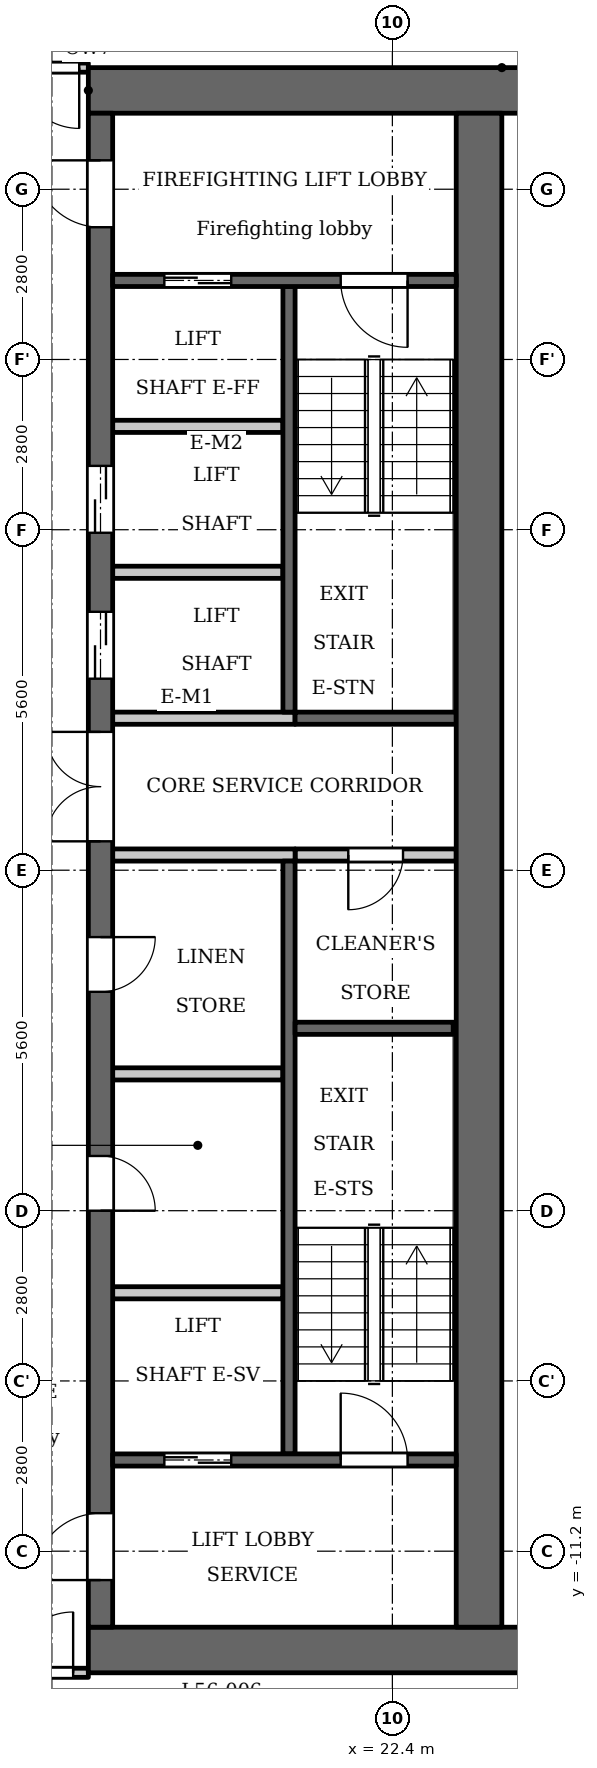
"""IFC4 building model, lengths in metres.
Left out: names, types, materials, properties, quantities, classifications, styles, units other than length and angle.
Written with IfcOpenShell. Run it as: python <this file> out.ifc"""

import sys

from ifc_helpers import new_model, si_unit, direction, frame, frame_2d, origin, place, context, subcontext, project, spatial, rectangle, extrude, element, fill, save


model = new_model("IFC4")
c1 = context("Model", 3, precision=1e-05, world=origin(), true_north=direction((0.0, 1.0)))
c2 = subcontext(c1, "Body", "Model", "MODEL_VIEW")
j1 = project(units=[si_unit("LENGTHUNIT", "METRE"), si_unit("PLANEANGLEUNIT", "RADIAN")], contexts=[c1])
p1 = place(None, origin())
s1 = spatial("IfcSite", under=j1, at=p1, CompositionType="ELEMENT")
p2 = place(p1, origin())
s2 = spatial("IfcBuilding", under=s1, at=p2, CompositionType="ELEMENT")
p3 = place(p2, frame((0.0, 0.0, 216.9)))
s3 = spatial("IfcBuildingStorey", under=s2, at=p3, CompositionType="ELEMENT", Elevation=216.9)
p4 = place(p3, frame((20.7, 2.6, 0.0), z_axis=(0.0, 0.0, 1.0), x_axis=(0.0, 1.0, 0.0)))
e1 = element("IfcWall", 1, at=p4, inside=s3, PredefinedType="SHEAR", context=c2, shape_type="SweptSolid", body=[
    extrude(rectangle(XDim=7.0, YDim=0.2, at=frame_2d((3.5, 0.0))), origin(), (0.0, 0.0, 1.0), 3.2),
])
p5 = place(p3, frame((20.7, -9.6, 0.0), z_axis=(0.0, 0.0, 1.0), x_axis=(0.0, 1.0, 0.0)))
e2 = element("IfcWall", 2, at=p5, inside=s3, PredefinedType="SHEAR", context=c2, shape_type="SweptSolid", body=[
    extrude(rectangle(XDim=9.75, YDim=0.2, at=frame_2d((4.875, 0.0))), origin(), (0.0, 0.0, 1.0), 3.2),
])
p6 = place(p3, frame((20.8, 2.5, 0.0), z_axis=(0.0, 0.0, 1.0), x_axis=(1.0, 0.0, 0.0)))
e3 = element("IfcWall", 3, at=p6, inside=s3, PredefinedType="SHEAR", context=c2, shape_type="SweptSolid", body=[
    extrude(rectangle(XDim=2.65, YDim=0.2, at=frame_2d((1.325, 0.0))), origin(), (0.0, 0.0, 1.0), 3.2),
])
p7 = place(p3, frame((20.8, 0.25, 0.0), z_axis=(0.0, 0.0, 1.0), x_axis=(1.0, 0.0, 0.0)))
e4 = element("IfcWall", 4, at=p7, inside=s3, PredefinedType="PARTITIONING", context=c2, shape_type="SweptSolid", body=[
    extrude(rectangle(XDim=2.65, YDim=0.2, at=frame_2d((1.325, 0.0))), origin(), (0.0, 0.0, 1.0), 3.2),
])
p8 = place(p7, frame((0.875, 0.0, 0.0)))
e5 = element("IfcOpeningElement", 5, at=p8, cuts=e4, PredefinedType="OPENING", context=c2, shape_type="SweptSolid", body=[
    extrude(rectangle(XDim=0.9, YDim=2.1, at=frame_2d((0.45, 1.05))), frame((0.0, 0.11, 0.0), z_axis=(0.0, -1.0, 0.0), x_axis=(1.0, 0.0, 0.0)), (0.0, 0.0, 1.0), 0.22),
])
for number, where, z_axis, x_axis in (
    (6, (17.4, 12.825, 0.0), (0.0, 0.0, 1.0), (1.0, 0.0, 0.0)),
    (7, (17.4, -12.825, 0.0), (0.0, 0.0, 1.0), (1.0, 0.0, 0.0)),
):
    element("IfcWall", number, at=place(p3, frame(where, z_axis=z_axis, x_axis=x_axis)), inside=s3, PredefinedType="SHEAR", context=c2, shape_type="SweptSolid", body=[
        extrude(rectangle(XDim=7.6, YDim=0.75, at=frame_2d((3.8, 0.0))), origin(), (0.0, 0.0, 1.0), 3.2),
    ])
p9 = place(p3, frame((17.8, -3.35, 0.0), z_axis=(0.0, 0.0, 1.0), x_axis=(1.0, 0.0, 0.0)))
e8 = element("IfcWall", 8, at=p9, inside=s3, PredefinedType="PARTITIONING", context=c2, shape_type="SweptSolid", body=[
    extrude(rectangle(XDim=2.8, YDim=0.2, at=frame_2d((1.4, 0.0))), origin(), (0.0, 0.0, 1.0), 3.2),
])
p10 = place(p3, frame((17.6, -12.45, 0.0), z_axis=(0.0, 0.0, 1.0), x_axis=(0.0, 1.0, 0.0)))
e9 = element("IfcWall", 9, at=p10, inside=s3, PredefinedType="SHEAR", context=c2, shape_type="SweptSolid", body=[
    extrude(rectangle(XDim=24.9, YDim=0.4, at=frame_2d((12.45, 0.0))), origin(), (0.0, 0.0, 1.0), 3.2),
])
p11 = place(p10, frame((6.85, 0.0, 0.0)))
e10 = element("IfcOpeningElement", 10, at=p11, cuts=e9, PredefinedType="OPENING", context=c2, shape_type="SweptSolid", body=[
    extrude(rectangle(XDim=0.9, YDim=2.1, at=frame_2d((0.45, 1.05))), frame((0.0, 0.21, 0.0), z_axis=(0.0, -1.0, 0.0), x_axis=(1.0, 0.0, 0.0)), (0.0, 0.0, 1.0), 0.42),
])
p12 = place(p10, frame((10.45, 0.0, 0.0)))
e11 = element("IfcOpeningElement", 11, at=p12, cuts=e9, PredefinedType="OPENING", context=c2, shape_type="SweptSolid", body=[
    extrude(rectangle(XDim=0.9, YDim=2.1, at=frame_2d((0.45, 1.05))), frame((0.0, 0.21, 0.0), z_axis=(0.0, -1.0, 0.0), x_axis=(1.0, 0.0, 0.0)), (0.0, 0.0, 1.0), 0.42),
])
p13 = place(p10, frame((15.6, 0.0, 0.0)))
e12 = element("IfcOpeningElement", 12, at=p13, cuts=e9, PredefinedType="OPENING", context=c2, shape_type="SweptSolid", body=[
    extrude(rectangle(XDim=1.1, YDim=2.1, at=frame_2d((0.55, 1.05))), frame((0.0, 0.21, 0.0), z_axis=(0.0, -1.0, 0.0), x_axis=(1.0, 0.0, 0.0)), (0.0, 0.0, 1.0), 0.42),
])
p14 = place(p10, frame((18.0, 0.0, 0.0)))
e13 = element("IfcOpeningElement", 13, at=p14, cuts=e9, PredefinedType="OPENING", context=c2, shape_type="SweptSolid", body=[
    extrude(rectangle(XDim=1.1, YDim=2.1, at=frame_2d((0.55, 1.05))), frame((0.0, 0.21, 0.0), z_axis=(0.0, -1.0, 0.0), x_axis=(1.0, 0.0, 0.0)), (0.0, 0.0, 1.0), 0.42),
])
p15 = place(p10, frame((23.025, 0.0, 0.0)))
e14 = element("IfcOpeningElement", 14, at=p15, cuts=e9, PredefinedType="OPENING", context=c2, shape_type="SweptSolid", body=[
    extrude(rectangle(XDim=1.1, YDim=2.1, at=frame_2d((0.55, 1.05))), frame((0.0, 0.21, 0.0), z_axis=(0.0, -1.0, 0.0), x_axis=(1.0, 0.0, 0.0)), (0.0, 0.0, 1.0), 0.42),
])
p16 = place(p10, frame((0.775, 0.0, 0.0)))
e15 = element("IfcOpeningElement", 15, at=p16, cuts=e9, PredefinedType="OPENING", context=c2, shape_type="SweptSolid", body=[
    extrude(rectangle(XDim=1.1, YDim=2.1, at=frame_2d((0.55, 1.05))), frame((0.0, 0.21, 0.0), z_axis=(0.0, -1.0, 0.0), x_axis=(1.0, 0.0, 0.0)), (0.0, 0.0, 1.0), 0.42),
])
p17 = place(p10, frame((12.925, 0.0, 0.0)))
e16 = element("IfcOpeningElement", 16, at=p17, cuts=e9, PredefinedType="OPENING", context=c2, shape_type="SweptSolid", body=[
    extrude(rectangle(XDim=1.8, YDim=2.1, at=frame_2d((0.9, 1.05))), frame((0.0, 0.21, 0.0), z_axis=(0.0, -1.0, 0.0), x_axis=(1.0, 0.0, 0.0)), (0.0, 0.0, 1.0), 0.42),
])
p18 = place(p3, frame((23.825, -12.45, 0.0), z_axis=(0.0, 0.0, 1.0), x_axis=(0.0, 1.0, 0.0)))
e17 = element("IfcWall", 17, at=p18, inside=s3, PredefinedType="SHEAR", context=c2, shape_type="SweptSolid", body=[
    extrude(rectangle(XDim=24.9, YDim=0.75, at=frame_2d((12.45, 0.0))), origin(), (0.0, 0.0, 1.0), 3.2),
])
p19 = place(p3, frame((17.8, -9.7, 0.0), z_axis=(0.0, 0.0, 1.0), x_axis=(1.0, 0.0, 0.0)))
e18 = element("IfcWall", 18, at=p19, inside=s3, PredefinedType="SHEAR", context=c2, shape_type="SweptSolid", body=[
    extrude(rectangle(XDim=5.65, YDim=0.2, at=frame_2d((2.825, 0.0))), origin(), (0.0, 0.0, 1.0), 3.2),
])
p20 = place(p19, frame((0.85, 0.0, 0.0)))
e19 = element("IfcOpeningElement", 19, at=p20, cuts=e18, PredefinedType="OPENING", context=c2, shape_type="SweptSolid", body=[
    extrude(rectangle(XDim=1.1, YDim=2.1, at=frame_2d((0.55, 1.05))), frame((0.0, 0.11, 0.0), z_axis=(0.0, -1.0, 0.0), x_axis=(1.0, 0.0, 0.0)), (0.0, 0.0, 1.0), 0.22),
])
p21 = place(p19, frame((3.75, 0.0, 0.0)))
e20 = element("IfcOpeningElement", 20, at=p21, cuts=e18, PredefinedType="OPENING", context=c2, shape_type="SweptSolid", body=[
    extrude(rectangle(XDim=1.1, YDim=2.1, at=frame_2d((0.55, 1.05))), frame((0.0, 0.11, 0.0), z_axis=(0.0, -1.0, 0.0), x_axis=(1.0, 0.0, 0.0)), (0.0, 0.0, 1.0), 0.22),
])
p22 = place(p3, frame((17.8, -6.95, 0.0), z_axis=(0.0, 0.0, 1.0), x_axis=(1.0, 0.0, 0.0)))
e21 = element("IfcWall", 21, at=p22, inside=s3, PredefinedType="PARTITIONING", context=c2, shape_type="SweptSolid", body=[
    extrude(rectangle(XDim=2.8, YDim=0.2, at=frame_2d((1.4, 0.0))), origin(), (0.0, 0.0, 1.0), 3.2),
])
for number, where, z_axis, x_axis in (
    (22, (17.8, 0.25, 0.0), (0.0, 0.0, 1.0), (1.0, 0.0, 0.0)),
    (23, (17.8, 2.5, 0.0), (0.0, 0.0, 1.0), (1.0, 0.0, 0.0)),
):
    element("IfcWall", number, at=place(p3, frame(where, z_axis=z_axis, x_axis=x_axis)), inside=s3, PredefinedType="PARTITIONING", context=c2, shape_type="SweptSolid", body=[
        extrude(rectangle(XDim=3.0, YDim=0.2, at=frame_2d((1.5, 0.0))), origin(), (0.0, 0.0, 1.0), 3.2),
    ])
for number, where, z_axis, x_axis in (
    (24, (17.8, 4.9, 0.0), (0.0, 0.0, 1.0), (1.0, 0.0, 0.0)),
    (25, (17.8, 7.3, 0.0), (0.0, 0.0, 1.0), (1.0, 0.0, 0.0)),
):
    element("IfcWall", number, at=place(p3, frame(where, z_axis=z_axis, x_axis=x_axis)), inside=s3, PredefinedType="PARTITIONING", context=c2, shape_type="SweptSolid", body=[
        extrude(rectangle(XDim=2.8, YDim=0.2, at=frame_2d((1.4, 0.0))), origin(), (0.0, 0.0, 1.0), 3.2),
    ])
p23 = place(p3, frame((17.8, 9.7, 0.0), z_axis=(0.0, 0.0, 1.0), x_axis=(1.0, 0.0, 0.0)))
e26 = element("IfcWall", 26, at=p23, inside=s3, PredefinedType="SHEAR", context=c2, shape_type="SweptSolid", body=[
    extrude(rectangle(XDim=5.65, YDim=0.2, at=frame_2d((2.825, 0.0))), origin(), (0.0, 0.0, 1.0), 3.2),
])
p24 = place(p23, frame((0.85, 0.0, 0.0)))
e27 = element("IfcOpeningElement", 27, at=p24, cuts=e26, PredefinedType="OPENING", context=c2, shape_type="SweptSolid", body=[
    extrude(rectangle(XDim=1.1, YDim=2.1, at=frame_2d((0.55, 1.05))), frame((0.0, 0.11, 0.0), z_axis=(0.0, -1.0, 0.0), x_axis=(1.0, 0.0, 0.0)), (0.0, 0.0, 1.0), 0.22),
])
p25 = place(p23, frame((3.75, 0.0, 0.0)))
e28 = element("IfcOpeningElement", 28, at=p25, cuts=e26, PredefinedType="OPENING", context=c2, shape_type="SweptSolid", body=[
    extrude(rectangle(XDim=1.1, YDim=2.1, at=frame_2d((0.55, 1.05))), frame((0.0, 0.11, 0.0), z_axis=(0.0, -1.0, 0.0), x_axis=(1.0, 0.0, 0.0)), (0.0, 0.0, 1.0), 0.22),
])
p26 = place(p3, frame((20.8, -2.6, 0.0), z_axis=(0.0, 0.0, 1.0), x_axis=(1.0, 0.0, 0.0)))
e29 = element("IfcWall", 29, at=p26, inside=s3, PredefinedType="SHEAR", context=c2, shape_type="SweptSolid", body=[
    extrude(rectangle(XDim=2.6, YDim=0.2, at=frame_2d((1.3, 0.0))), origin(), (0.0, 0.0, 1.0), 3.2),
])
p27 = place(p3, frame((-17.4, -13.2, 0.0), z_axis=(0.0, 0.0, 1.0), x_axis=(1.0, 0.0, 0.0)))
e30 = element("IfcWall", 30, at=p27, inside=s3, PredefinedType="PARTITIONING", context=c2, shape_type="SweptSolid", body=[
    extrude(rectangle(XDim=34.8, YDim=0.15, at=frame_2d((17.4, 0.0))), origin(), (0.0, 0.0, 1.0), 3.2),
])
p28 = place(p27, frame((0.15, 0.0, 0.0)))
e31 = element("IfcOpeningElement", 31, at=p28, cuts=e30, PredefinedType="OPENING", context=c2, shape_type="SweptSolid", body=[
    extrude(rectangle(XDim=1.0, YDim=2.1, at=frame_2d((0.5, 1.05))), frame((0.0, 0.085, 0.0), z_axis=(0.0, -1.0, 0.0), x_axis=(1.0, 0.0, 0.0)), (0.0, 0.0, 1.0), 0.17),
])
p29 = place(p27, frame((33.55, 0.0, 0.0)))
e32 = element("IfcOpeningElement", 32, at=p29, cuts=e30, PredefinedType="OPENING", context=c2, shape_type="SweptSolid", body=[
    extrude(rectangle(XDim=1.0, YDim=2.1, at=frame_2d((0.5, 1.05))), frame((0.0, 0.085, 0.0), z_axis=(0.0, -1.0, 0.0), x_axis=(1.0, 0.0, 0.0)), (0.0, 0.0, 1.0), 0.17),
])
p30 = place(p27, frame((3.7, 0.0, 0.0)))
e33 = element("IfcOpeningElement", 33, at=p30, cuts=e30, PredefinedType="OPENING", context=c2, shape_type="SweptSolid", body=[
    extrude(rectangle(XDim=1.0, YDim=2.1, at=frame_2d((0.5, 1.05))), frame((0.0, 0.085, 0.0), z_axis=(0.0, -1.0, 0.0), x_axis=(1.0, 0.0, 0.0)), (0.0, 0.0, 1.0), 0.17),
])
p31 = place(p27, frame((15.7, 0.0, 0.0)))
e34 = element("IfcOpeningElement", 34, at=p31, cuts=e30, PredefinedType="OPENING", context=c2, shape_type="SweptSolid", body=[
    extrude(rectangle(XDim=1.0, YDim=2.1, at=frame_2d((0.5, 1.05))), frame((0.0, 0.085, 0.0), z_axis=(0.0, -1.0, 0.0), x_axis=(1.0, 0.0, 0.0)), (0.0, 0.0, 1.0), 0.17),
])
p32 = place(p27, frame((21.3, 0.0, 0.0)))
e35 = element("IfcOpeningElement", 35, at=p32, cuts=e30, PredefinedType="OPENING", context=c2, shape_type="SweptSolid", body=[
    extrude(rectangle(XDim=1.0, YDim=2.1, at=frame_2d((0.5, 1.05))), frame((0.0, 0.085, 0.0), z_axis=(0.0, -1.0, 0.0), x_axis=(1.0, 0.0, 0.0)), (0.0, 0.0, 1.0), 0.17),
])
p33 = place(p27, frame((29.5, 0.0, 0.0)))
e36 = element("IfcOpeningElement", 36, at=p33, cuts=e30, PredefinedType="OPENING", context=c2, shape_type="SweptSolid", body=[
    extrude(rectangle(XDim=1.0, YDim=2.1, at=frame_2d((0.5, 1.05))), frame((0.0, 0.085, 0.0), z_axis=(0.0, -1.0, 0.0), x_axis=(1.0, 0.0, 0.0)), (0.0, 0.0, 1.0), 0.17),
])
p34 = place(p3, frame((-17.4, 13.2, 0.0), z_axis=(0.0, 0.0, 1.0), x_axis=(1.0, 0.0, 0.0)))
e37 = element("IfcWall", 37, at=p34, inside=s3, PredefinedType="PARTITIONING", context=c2, shape_type="SweptSolid", body=[
    extrude(rectangle(XDim=34.8, YDim=0.15, at=frame_2d((17.4, 0.0))), origin(), (0.0, 0.0, 1.0), 3.2),
])
p35 = place(p34, frame((0.25, 0.0, 0.0)))
e38 = element("IfcOpeningElement", 38, at=p35, cuts=e37, PredefinedType="OPENING", context=c2, shape_type="SweptSolid", body=[
    extrude(rectangle(XDim=1.0, YDim=2.1, at=frame_2d((0.5, 1.05))), frame((0.0, 0.085, 0.0), z_axis=(0.0, -1.0, 0.0), x_axis=(1.0, 0.0, 0.0)), (0.0, 0.0, 1.0), 0.17),
])
p36 = place(p34, frame((33.65, 0.0, 0.0)))
e39 = element("IfcOpeningElement", 39, at=p36, cuts=e37, PredefinedType="OPENING", context=c2, shape_type="SweptSolid", body=[
    extrude(rectangle(XDim=1.0, YDim=2.1, at=frame_2d((0.5, 1.05))), frame((0.0, 0.085, 0.0), z_axis=(0.0, -1.0, 0.0), x_axis=(1.0, 0.0, 0.0)), (0.0, 0.0, 1.0), 0.17),
])
p37 = place(p34, frame((15.75, 0.0, 0.0)))
e40 = element("IfcOpeningElement", 40, at=p37, cuts=e37, PredefinedType="OPENING", context=c2, shape_type="SweptSolid", body=[
    extrude(rectangle(XDim=1.0, YDim=2.1, at=frame_2d((0.5, 1.05))), frame((0.0, 0.085, 0.0), z_axis=(0.0, -1.0, 0.0), x_axis=(1.0, 0.0, 0.0)), (0.0, 0.0, 1.0), 0.17),
])
p38 = place(p34, frame((26.95, 0.0, 0.0)))
e41 = element("IfcOpeningElement", 41, at=p38, cuts=e37, PredefinedType="OPENING", context=c2, shape_type="SweptSolid", body=[
    extrude(rectangle(XDim=1.0, YDim=2.1, at=frame_2d((0.5, 1.05))), frame((0.0, 0.085, 0.0), z_axis=(0.0, -1.0, 0.0), x_axis=(1.0, 0.0, 0.0)), (0.0, 0.0, 1.0), 0.17),
])
p39 = place(p34, frame((29.75, 0.0, 0.0)))
e42 = element("IfcOpeningElement", 42, at=p39, cuts=e37, PredefinedType="OPENING", context=c2, shape_type="SweptSolid", body=[
    extrude(rectangle(XDim=1.0, YDim=2.1, at=frame_2d((0.5, 1.05))), frame((0.0, 0.085, 0.0), z_axis=(0.0, -1.0, 0.0), x_axis=(1.0, 0.0, 0.0)), (0.0, 0.0, 1.0), 0.17),
])
p40 = place(p20, origin())
e43 = element("IfcDoor", 43, at=p40, inside=s3, OperationType="DOUBLE_DOOR_SLIDING", PredefinedType="DOOR", context=c2, shape_type="SweptSolid", body=[
    extrude(rectangle(XDim=1.1, YDim=2.1, at=frame_2d((0.55, 1.05))), frame((0.0, 0.025, 0.0), z_axis=(0.0, -1.0, 0.0), x_axis=(1.0, 0.0, 0.0)), (0.0, 0.0, 1.0), 0.05),
])
fill(e19, e43)
p41 = place(p11, origin())
e44 = element("IfcDoor", 44, at=p41, inside=s3, OperationType="SINGLE_SWING_LEFT", PredefinedType="DOOR", context=c2, shape_type="SweptSolid", body=[
    extrude(rectangle(XDim=0.9, YDim=2.1, at=frame_2d((0.45, 1.05))), frame((0.0, 0.025, 0.0), z_axis=(0.0, -1.0, 0.0), x_axis=(1.0, 0.0, 0.0)), (0.0, 0.0, 1.0), 0.05),
])
fill(e10, e44)
p42 = place(p12, origin())
e45 = element("IfcDoor", 45, at=p42, inside=s3, OperationType="SINGLE_SWING_RIGHT", PredefinedType="DOOR", context=c2, shape_type="SweptSolid", body=[
    extrude(rectangle(XDim=0.9, YDim=2.1, at=frame_2d((0.45, 1.05))), frame((0.0, 0.025, 0.0), z_axis=(0.0, -1.0, 0.0), x_axis=(1.0, 0.0, 0.0)), (0.0, 0.0, 1.0), 0.05),
])
fill(e11, e45)
p43 = place(p13, origin())
e46 = element("IfcDoor", 46, at=p43, inside=s3, OperationType="DOUBLE_DOOR_SLIDING", PredefinedType="DOOR", context=c2, shape_type="SweptSolid", body=[
    extrude(rectangle(XDim=1.1, YDim=2.1, at=frame_2d((0.55, 1.05))), frame((0.0, 0.025, 0.0), z_axis=(0.0, -1.0, 0.0), x_axis=(1.0, 0.0, 0.0)), (0.0, 0.0, 1.0), 0.05),
])
fill(e12, e46)
p44 = place(p14, origin())
e47 = element("IfcDoor", 47, at=p44, inside=s3, OperationType="DOUBLE_DOOR_SLIDING", PredefinedType="DOOR", context=c2, shape_type="SweptSolid", body=[
    extrude(rectangle(XDim=1.1, YDim=2.1, at=frame_2d((0.55, 1.05))), frame((0.0, 0.025, 0.0), z_axis=(0.0, -1.0, 0.0), x_axis=(1.0, 0.0, 0.0)), (0.0, 0.0, 1.0), 0.05),
])
fill(e13, e47)
p45 = place(p24, origin())
e48 = element("IfcDoor", 48, at=p45, inside=s3, OperationType="DOUBLE_DOOR_SLIDING", PredefinedType="DOOR", context=c2, shape_type="SweptSolid", body=[
    extrude(rectangle(XDim=1.1, YDim=2.1, at=frame_2d((0.55, 1.05))), frame((0.0, 0.025, 0.0), z_axis=(0.0, -1.0, 0.0), x_axis=(1.0, 0.0, 0.0)), (0.0, 0.0, 1.0), 0.05),
])
fill(e27, e48)
p46 = place(p15, origin())
e49 = element("IfcDoor", 49, at=p46, inside=s3, OperationType="SINGLE_SWING_LEFT", PredefinedType="DOOR", context=c2, shape_type="SweptSolid", body=[
    extrude(rectangle(XDim=1.1, YDim=2.1, at=frame_2d((0.55, 1.05))), frame((0.0, 0.025, 0.0), z_axis=(0.0, -1.0, 0.0), x_axis=(1.0, 0.0, 0.0)), (0.0, 0.0, 1.0), 0.05),
])
fill(e14, e49)
p47 = place(p16, origin())
e50 = element("IfcDoor", 50, at=p47, inside=s3, OperationType="SINGLE_SWING_RIGHT", PredefinedType="DOOR", context=c2, shape_type="SweptSolid", body=[
    extrude(rectangle(XDim=1.1, YDim=2.1, at=frame_2d((0.55, 1.05))), frame((0.0, 0.025, 0.0), z_axis=(0.0, -1.0, 0.0), x_axis=(1.0, 0.0, 0.0)), (0.0, 0.0, 1.0), 0.05),
])
fill(e15, e50)
p48 = place(p25, origin())
e51 = element("IfcDoor", 51, at=p48, inside=s3, OperationType="SINGLE_SWING_RIGHT", PredefinedType="DOOR", context=c2, shape_type="SweptSolid", body=[
    extrude(rectangle(XDim=1.1, YDim=2.1, at=frame_2d((0.55, 1.05))), frame((0.0, 0.025, 0.0), z_axis=(0.0, -1.0, 0.0), x_axis=(1.0, 0.0, 0.0)), (0.0, 0.0, 1.0), 0.05),
])
fill(e28, e51)
p49 = place(p21, origin())
e52 = element("IfcDoor", 52, at=p49, inside=s3, OperationType="SINGLE_SWING_RIGHT", PredefinedType="DOOR", context=c2, shape_type="SweptSolid", body=[
    extrude(rectangle(XDim=1.1, YDim=2.1, at=frame_2d((0.55, 1.05))), frame((0.0, 0.025, 0.0), z_axis=(0.0, -1.0, 0.0), x_axis=(1.0, 0.0, 0.0)), (0.0, 0.0, 1.0), 0.05),
])
fill(e20, e52)
p50 = place(p17, origin())
e53 = element("IfcDoor", 53, at=p50, inside=s3, OperationType="DOUBLE_DOOR_SINGLE_SWING", PredefinedType="DOOR", context=c2, shape_type="SweptSolid", body=[
    extrude(rectangle(XDim=1.8, YDim=2.1, at=frame_2d((0.9, 1.05))), frame((0.0, 0.025, 0.0), z_axis=(0.0, -1.0, 0.0), x_axis=(1.0, 0.0, 0.0)), (0.0, 0.0, 1.0), 0.05),
])
fill(e16, e53)
p51 = place(p8, origin())
e54 = element("IfcDoor", 54, at=p51, inside=s3, OperationType="SINGLE_SWING_LEFT", PredefinedType="DOOR", context=c2, shape_type="SweptSolid", body=[
    extrude(rectangle(XDim=0.9, YDim=2.1, at=frame_2d((0.45, 1.05))), frame((0.0, 0.025, 0.0), z_axis=(0.0, -1.0, 0.0), x_axis=(1.0, 0.0, 0.0)), (0.0, 0.0, 1.0), 0.05),
])
fill(e5, e54)
p52 = place(p36, origin())
e55 = element("IfcDoor", 55, at=p52, inside=s3, OperationType="SINGLE_SWING_RIGHT", PredefinedType="DOOR", context=c2, shape_type="SweptSolid", body=[
    extrude(rectangle(XDim=1.0, YDim=2.1, at=frame_2d((0.5, 1.05))), frame((0.0, 0.025, 0.0), z_axis=(0.0, -1.0, 0.0), x_axis=(1.0, 0.0, 0.0)), (0.0, 0.0, 1.0), 0.05),
])
fill(e39, e55)
p53 = place(p29, origin())
e56 = element("IfcDoor", 56, at=p53, inside=s3, OperationType="SINGLE_SWING_LEFT", PredefinedType="DOOR", context=c2, shape_type="SweptSolid", body=[
    extrude(rectangle(XDim=1.0, YDim=2.1, at=frame_2d((0.5, 1.05))), frame((0.0, 0.025, 0.0), z_axis=(0.0, -1.0, 0.0), x_axis=(1.0, 0.0, 0.0)), (0.0, 0.0, 1.0), 0.05),
])
fill(e32, e56)
save(model, sys.argv[1])
